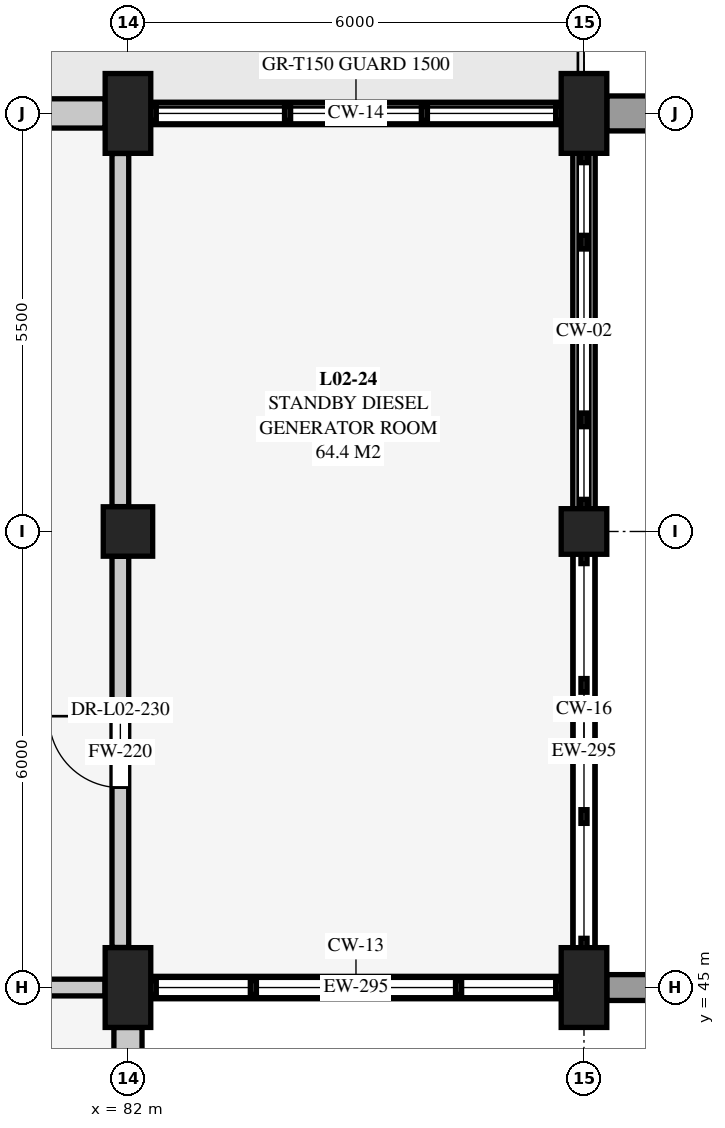
"""IFC4 building model, lengths in metres.
Left out: names, types, materials, properties, quantities, classifications, styles, units other than length and angle.
Written with IfcOpenShell. Run it as: python <this file> out.ifc"""

import sys

from ifc_helpers import new_model, si_unit, direction, frame, frame_2d, origin, origin_2d, place, context, subcontext, project, spatial, rectangle, extrude, element, fill, save


model = new_model("IFC4")
c1 = context("Model", 3, precision=1e-05, world=origin(), true_north=direction((0.0, 1.0)))
c2 = subcontext(c1, "Body", "Model", "MODEL_VIEW")
j1 = project(units=[si_unit("LENGTHUNIT", "METRE"), si_unit("PLANEANGLEUNIT", "RADIAN")], contexts=[c1])
p1 = place(None, origin())
s1 = spatial("IfcSite", under=j1, at=p1, CompositionType="ELEMENT")
p2 = place(p1, origin())
s2 = spatial("IfcBuilding", under=s1, at=p2, CompositionType="ELEMENT")
p3 = place(p2, frame((0.0, 0.0, 4.5)))
s3 = spatial("IfcBuildingStorey", under=s2, at=p3, CompositionType="ELEMENT", Elevation=4.5)
p4 = place(p3, frame((82.0, 45.0, 0.0), z_axis=(0.0, 0.0, 1.0), x_axis=(1.0, 0.0, 0.0)))
e1 = element("IfcColumn", 1, at=p4, inside=s3, PredefinedType="PILASTER", context=c2, shape_type="SweptSolid", body=[
    extrude(rectangle(XDim=0.6, YDim=1.05, at=origin_2d()), origin(), (0.0, 0.0, 1.0), 4.5),
])
p5 = place(p3, frame((82.0, 51.0, 0.0), z_axis=(0.0, 0.0, 1.0), x_axis=(1.0, 0.0, 0.0)))
e2 = element("IfcColumn", 2, at=p5, inside=s3, PredefinedType="COLUMN", context=c2, shape_type="SweptSolid", body=[
    extrude(rectangle(XDim=0.65, YDim=0.65, at=origin_2d()), origin(), (0.0, 0.0, 1.0), 4.5),
])
for number, where, z_axis, x_axis in (
    (3, (82.0, 56.5, 0.0), (0.0, 0.0, 1.0), (1.0, 0.0, 0.0)),
    (4, (88.0, 45.0, 0.0), (0.0, 0.0, 1.0), (1.0, 0.0, 0.0)),
):
    element("IfcColumn", number, at=place(p3, frame(where, z_axis=z_axis, x_axis=x_axis)), inside=s3, PredefinedType="PILASTER", context=c2, shape_type="SweptSolid", body=[
        extrude(rectangle(XDim=0.6, YDim=1.05, at=origin_2d()), origin(), (0.0, 0.0, 1.0), 4.5),
    ])
p6 = place(p3, frame((88.0, 51.0, 0.0), z_axis=(0.0, 0.0, 1.0), x_axis=(1.0, 0.0, 0.0)))
e5 = element("IfcColumn", 5, at=p6, inside=s3, PredefinedType="COLUMN", context=c2, shape_type="SweptSolid", body=[
    extrude(rectangle(XDim=0.6, YDim=0.6, at=origin_2d()), origin(), (0.0, 0.0, 1.0), 4.5),
])
p7 = place(p3, frame((88.0, 56.5, 0.0), z_axis=(0.0, 0.0, 1.0), x_axis=(1.0, 0.0, 0.0)))
e6 = element("IfcColumn", 6, at=p7, inside=s3, PredefinedType="PILASTER", context=c2, shape_type="SweptSolid", body=[
    extrude(rectangle(XDim=0.6, YDim=1.05, at=origin_2d()), origin(), (0.0, 0.0, 1.0), 4.5),
])
p8 = place(p3, frame((88.3, 45.0, 0.0), z_axis=(0.0, 0.0, 1.0), x_axis=(1.0, 0.0, 0.0)))
e7 = element("IfcWall", 7, at=p8, inside=s3, PredefinedType="USERDEFINED", context=c2, shape_type="SweptSolid", body=[
    extrude(rectangle(XDim=5.4, YDim=0.34, at=frame_2d((2.7, 0.0))), origin(), (0.0, 0.0, 1.0), 4.5),
])
p9 = place(p3, frame((88.3, 56.5, 0.0), z_axis=(0.0, 0.0, 1.0), x_axis=(1.0, 0.0, 0.0)))
e8 = element("IfcWall", 8, at=p9, inside=s3, PredefinedType="USERDEFINED", context=c2, shape_type="SweptSolid", body=[
    extrude(rectangle(XDim=5.4, YDim=0.46, at=frame_2d((2.7, 0.0))), origin(), (0.0, 0.0, 1.0), 4.5),
])
p10 = place(p3, frame((82.0, 44.475, 0.0), z_axis=(0.0, 0.0, 1.0), x_axis=(0.0, -1.0, 0.0)))
e9 = element("IfcWall", 9, at=p10, inside=s3, PredefinedType="SOLIDWALL", context=c2, shape_type="SweptSolid", body=[
    extrude(rectangle(XDim=5.2, YDim=0.37, at=frame_2d((2.6, 0.0))), origin(), (0.0, 0.0, 1.0), 3.821),
])
p11 = place(p10, frame((1.95, 0.0, 1.3)))
e10 = element("IfcOpeningElement", 10, at=p11, cuts=e9, PredefinedType="OPENING", context=c2, shape_type="SweptSolid", body=[
    extrude(rectangle(XDim=1.3, YDim=1.45, at=frame_2d((0.65, 0.725))), frame((0.0, 0.195, 0.0), z_axis=(0.0, -1.0, 0.0), x_axis=(1.0, 0.0, 0.0)), (0.0, 0.0, 1.0), 0.39),
])
p12 = place(p3, frame((76.3, 56.5, 0.0), z_axis=(0.0, 0.0, 1.0), x_axis=(1.0, 0.0, 0.0)))
e11 = element("IfcWall", 11, at=p12, inside=s3, PredefinedType="SOLIDWALL", context=c2, shape_type="SweptSolid", body=[
    extrude(rectangle(XDim=5.4, YDim=0.385, at=frame_2d((2.7, 0.0))), origin(), (0.0, 0.0, 1.0), 3.857),
])
p13 = place(p12, frame((1.92, 0.0, 0.0)))
e12 = element("IfcOpeningElement", 12, at=p13, cuts=e11, PredefinedType="OPENING", context=c2, shape_type="SweptSolid", body=[
    extrude(rectangle(XDim=1.56, YDim=2.18, at=frame_2d((0.78, 1.09))), frame((0.0, 0.202, 0.0), z_axis=(0.0, -1.0, 0.0), x_axis=(1.0, 0.0, 0.0)), (0.0, 0.0, 1.0), 0.405),
])
p14 = place(p3, frame((87.7, 45.0, 0.0), z_axis=(0.0, 0.0, 1.0), x_axis=(-1.0, 0.0, 0.0)))
e13 = element("IfcWall", 13, at=p14, inside=s3, PredefinedType="SOLIDWALL", context=c2, shape_type="SweptSolid", body=[
    extrude(rectangle(XDim=5.4, YDim=0.295, at=frame_2d((2.7, 0.0))), origin(), (0.0, 0.0, 1.0), 0.36),
])
p15 = place(p3, frame((82.3, 56.5, 0.0), z_axis=(0.0, 0.0, 1.0), x_axis=(1.0, 0.0, 0.0)))
e14 = element("IfcWall", 14, at=p15, inside=s3, PredefinedType="SOLIDWALL", context=c2, shape_type="SweptSolid", body=[
    extrude(rectangle(XDim=5.4, YDim=0.295, at=frame_2d((2.7, 0.0))), origin(), (0.0, 0.0, 1.0), 0.41),
])
p16 = place(p3, frame((88.0, 50.7, 0.0), z_axis=(0.0, 0.0, 1.0), x_axis=(0.0, -1.0, 0.0)))
e15 = element("IfcWall", 15, at=p16, inside=s3, PredefinedType="SOLIDWALL", context=c2, shape_type="SweptSolid", body=[
    extrude(rectangle(XDim=5.175, YDim=0.295, at=frame_2d((2.587, 0.0))), origin(), (0.0, 0.0, 1.0), 0.52),
])
p17 = place(p3, frame((88.0, 55.975, 0.0), z_axis=(0.0, 0.0, 1.0), x_axis=(0.0, -1.0, 0.0)))
e16 = element("IfcWall", 16, at=p17, inside=s3, PredefinedType="SOLIDWALL", context=c2, shape_type="SweptSolid", body=[
    extrude(rectangle(XDim=4.675, YDim=0.295, at=frame_2d((2.337, 0.0))), origin(), (0.0, 0.0, 1.0), 0.21),
])
p18 = place(p3, frame((76.277, 45.0, 0.0), z_axis=(0.0, 0.0, 1.0), x_axis=(1.0, 0.0, 0.0)))
e17 = element("IfcWall", 17, at=p18, inside=s3, PredefinedType="SOLIDWALL", context=c2, shape_type="SweptSolid", body=[
    extrude(rectangle(XDim=5.421, YDim=0.22, at=frame_2d((2.71, 0.0))), origin(), (0.0, 0.0, 1.0), 3.689),
])
p19 = place(p3, frame((81.9, 45.527, 0.0), z_axis=(0.0, 0.0, 1.0), x_axis=(0.0, 1.0, 0.0)))
e18 = element("IfcWall", 18, at=p19, inside=s3, PredefinedType="SOLIDWALL", context=c2, shape_type="SweptSolid", body=[
    extrude(rectangle(XDim=5.146, YDim=0.22, at=frame_2d((2.573, 0.0))), origin(), (0.0, 0.0, 1.0), 3.62),
])
p20 = place(p19, frame((2.103, 0.0, 0.0)))
e19 = element("IfcOpeningElement", 19, at=p20, cuts=e18, PredefinedType="OPENING", context=c2, shape_type="SweptSolid", body=[
    extrude(rectangle(XDim=0.94, YDim=2.1, at=frame_2d((0.47, 1.05))), frame((0.0, 0.12, 0.0), z_axis=(0.0, -1.0, 0.0), x_axis=(1.0, 0.0, 0.0)), (0.0, 0.0, 1.0), 0.24),
])
p21 = place(p3, frame((81.9, 51.327, 0.0), z_axis=(0.0, 0.0, 1.0), x_axis=(0.0, 1.0, 0.0)))
e20 = element("IfcWall", 20, at=p21, inside=s3, PredefinedType="SOLIDWALL", context=c2, shape_type="SweptSolid", body=[
    extrude(rectangle(XDim=4.646, YDim=0.22, at=frame_2d((2.323, 0.0))), origin(), (0.0, 0.0, 1.0), 4.264),
])
p22 = place(p20, origin())
e21 = element("IfcDoor", 21, at=p22, inside=s3, OperationType="SINGLE_SWING_RIGHT", PredefinedType="DOOR", context=c2, shape_type="SweptSolid", body=[
    extrude(rectangle(XDim=0.94, YDim=2.1, at=frame_2d((0.47, 1.05))), frame((0.0, 0.025, 0.0), z_axis=(0.0, -1.0, 0.0), x_axis=(1.0, 0.0, 0.0)), (0.0, 0.0, 1.0), 0.05),
])
fill(e19, e21)
save(model, sys.argv[1])
